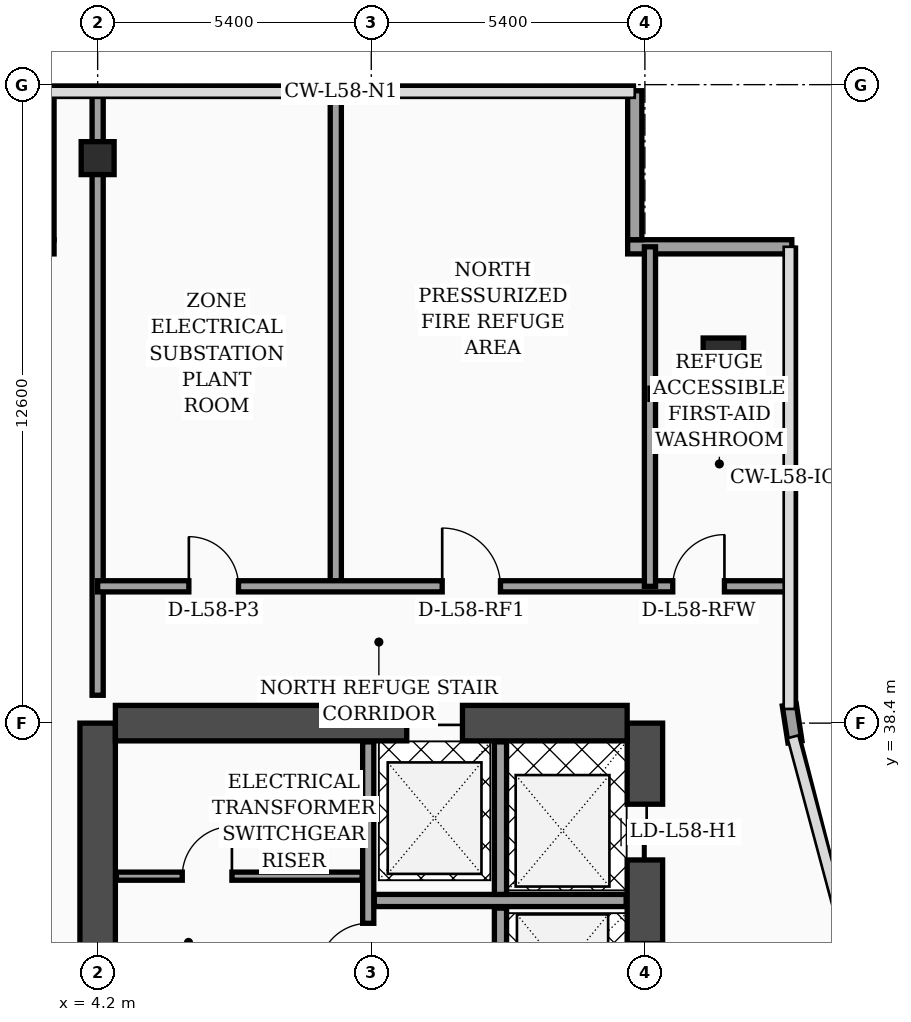
"""IFC4 building model, lengths in metres.
Left out: names, types, materials, properties, quantities, classifications, styles, units other than length and angle.
Written with IfcOpenShell. Run it as: python <this file> out.ifc"""

import sys

from ifc_helpers import new_model, si_unit, direction, frame, frame_2d, origin, origin_2d, place, context, subcontext, project, spatial, rectangle, hollow_rectangle, extrude, element, fill, save


model = new_model("IFC4")
c1 = context("Model", 3, precision=1e-05, world=origin(), true_north=direction((0.0, 1.0)))
c2 = subcontext(c1, "Body", "Model", "MODEL_VIEW")
j1 = project(units=[si_unit("LENGTHUNIT", "METRE"), si_unit("PLANEANGLEUNIT", "RADIAN")], contexts=[c1])
p1 = place(None, origin())
s1 = spatial("IfcSite", under=j1, at=p1, CompositionType="ELEMENT")
p2 = place(p1, origin())
s2 = spatial("IfcBuilding", under=s1, at=p2, CompositionType="ELEMENT")
p3 = place(p2, frame((0.0, 0.0, 234.5)))
s3 = spatial("IfcBuildingStorey", under=s2, at=p3, CompositionType="ELEMENT", Elevation=234.5)
p4 = place(p3, frame((4.2, 16.8, 0.0), z_axis=(0.0, 0.0, 1.0), x_axis=(0.0, 1.0, 0.0)))
e1 = element("IfcWall", 1, at=p4, inside=s3, PredefinedType="SHEAR", context=c2, shape_type="SweptSolid", body=[
    extrude(rectangle(XDim=21.6, YDim=0.7, at=frame_2d((10.8, 0.0))), origin(), (0.0, 0.0, 1.0), 4.56),
])
p5 = place(p3, frame((15.0, 16.8, 0.0), z_axis=(0.0, 0.0, 1.0), x_axis=(0.0, 1.0, 0.0)))
e2 = element("IfcWall", 2, at=p5, inside=s3, PredefinedType="SHEAR", context=c2, shape_type="SweptSolid", body=[
    extrude(rectangle(XDim=21.6, YDim=0.7, at=frame_2d((10.8, 0.0))), origin(), (0.0, 0.0, 1.0), 4.56),
])
p6 = place(p5, frame((8.65, 0.0, 0.0)))
e3 = element("IfcOpeningElement", 3, at=p6, cuts=e2, PredefinedType="OPENING", context=c2, shape_type="SweptSolid", body=[
    extrude(rectangle(XDim=1.1, YDim=2.2, at=frame_2d((0.55, 1.1))), frame((0.0, 0.36, 0.0), z_axis=(0.0, -1.0, 0.0), x_axis=(1.0, 0.0, 0.0)), (0.0, 0.0, 1.0), 0.72),
])
p7 = place(p5, frame((10.85, 0.0, 0.0)))
e4 = element("IfcOpeningElement", 4, at=p7, cuts=e2, PredefinedType="OPENING", context=c2, shape_type="SweptSolid", body=[
    extrude(rectangle(XDim=1.1, YDim=2.2, at=frame_2d((0.55, 1.1))), frame((0.0, 0.36, 0.0), z_axis=(0.0, -1.0, 0.0), x_axis=(1.0, 0.0, 0.0)), (0.0, 0.0, 1.0), 0.72),
])
p8 = place(p5, frame((13.5, 0.0, 0.0)))
e5 = element("IfcOpeningElement", 5, at=p8, cuts=e2, PredefinedType="OPENING", context=c2, shape_type="SweptSolid", body=[
    extrude(rectangle(XDim=1.1, YDim=2.2, at=frame_2d((0.55, 1.1))), frame((0.0, 0.36, 0.0), z_axis=(0.0, -1.0, 0.0), x_axis=(1.0, 0.0, 0.0)), (0.0, 0.0, 1.0), 0.72),
])
p9 = place(p5, frame((16.15, 0.0, 0.0)))
e6 = element("IfcOpeningElement", 6, at=p9, cuts=e2, PredefinedType="OPENING", context=c2, shape_type="SweptSolid", body=[
    extrude(rectangle(XDim=1.1, YDim=2.2, at=frame_2d((0.55, 1.1))), frame((0.0, 0.36, 0.0), z_axis=(0.0, -1.0, 0.0), x_axis=(1.0, 0.0, 0.0)), (0.0, 0.0, 1.0), 0.72),
])
p10 = place(p5, frame((18.9, 0.0, 0.0)))
e7 = element("IfcOpeningElement", 7, at=p10, cuts=e2, PredefinedType="OPENING", context=c2, shape_type="SweptSolid", body=[
    extrude(rectangle(XDim=1.1, YDim=2.2, at=frame_2d((0.55, 1.1))), frame((0.0, 0.36, 0.0), z_axis=(0.0, -1.0, 0.0), x_axis=(1.0, 0.0, 0.0)), (0.0, 0.0, 1.0), 0.72),
])
p11 = place(p3, frame((4.55, 38.4, 0.0), z_axis=(0.0, 0.0, 1.0), x_axis=(1.0, 0.0, 0.0)))
e8 = element("IfcWall", 8, at=p11, inside=s3, PredefinedType="SHEAR", context=c2, shape_type="SweptSolid", body=[
    extrude(rectangle(XDim=10.1, YDim=0.7, at=frame_2d((5.05, 0.0))), origin(), (0.0, 0.0, 1.0), 4.56),
])
p12 = place(p11, frame((5.75, 0.0, 0.0)))
e9 = element("IfcOpeningElement", 9, at=p12, cuts=e8, PredefinedType="OPENING", context=c2, shape_type="SweptSolid", body=[
    extrude(rectangle(XDim=1.1, YDim=2.2, at=frame_2d((0.55, 1.1))), frame((0.0, 0.36, 0.0), z_axis=(0.0, -1.0, 0.0), x_axis=(1.0, 0.0, 0.0)), (0.0, 0.0, 1.0), 0.72),
])
p13 = place(p3, frame((4.2, 49.55, 0.0), z_axis=(0.0, 0.0, 1.0), x_axis=(1.0, 0.0, 0.0)))
e10 = element("IfcColumn", 10, at=p13, inside=s3, PredefinedType="COLUMN", context=c2, shape_type="SweptSolid", body=[
    extrude(hollow_rectangle(XDim=0.65, YDim=0.65, WallThickness=0.028, at=origin_2d()), origin(), (0.0, 0.0, 1.0), 4.56),
])
p14 = place(p3, frame((16.55, 45.6, 0.0), z_axis=(0.0, 0.0, 1.0), x_axis=(1.0, 0.0, 0.0)))
e11 = element("IfcColumn", 11, at=p14, inside=s3, PredefinedType="COLUMN", context=c2, shape_type="SweptSolid", body=[
    extrude(rectangle(XDim=0.8, YDim=0.8, at=origin_2d()), origin(), (0.0, 0.0, 1.0), 4.56),
])
p15 = place(p3, frame((17.962, 38.03, 0.0), z_axis=(0.0, 0.0, 1.0), x_axis=(-0.15141125477, 0.988470855377, 0.0)))
e12 = element("IfcWall", 12, at=p15, inside=s3, PredefinedType="SOLIDWALL", context=c2, shape_type="SweptSolid", body=[
    extrude(rectangle(XDim=0.739, YDim=0.28, at=frame_2d((0.369, 0.0))), origin(), (0.0, 0.0, 1.0), 4.56),
])
p16 = place(p3, frame((17.9, 47.8, 0.0), z_axis=(0.0, 0.0, 1.0), x_axis=(-1.0, 0.0, 0.0)))
e13 = element("IfcWall", 13, at=p16, inside=s3, PredefinedType="SOLIDWALL", context=c2, shape_type="SweptSolid", body=[
    extrude(rectangle(XDim=3.24, YDim=0.28, at=frame_2d((1.62, 0.0))), origin(), (0.0, 0.0, 1.0), 4.56),
])
p17 = place(p3, frame((14.8, 47.94, 0.0), z_axis=(0.0, 0.0, 1.0), x_axis=(0.0, 1.0, 0.0)))
e14 = element("IfcWall", 14, at=p17, inside=s3, PredefinedType="SOLIDWALL", context=c2, shape_type="SweptSolid", body=[
    extrude(rectangle(XDim=2.94, YDim=0.28, at=frame_2d((1.47, 0.0))), origin(), (0.0, 0.0, 1.0), 4.56),
])
p18 = place(p3, frame((3.2, 50.88, 0.0), z_axis=(0.0, 0.0, 1.0), x_axis=(0.0, -1.0, 0.0)))
e15 = element("IfcWall", 15, at=p18, inside=s3, PredefinedType="SOLIDWALL", context=c2, shape_type="SweptSolid", body=[
    extrude(rectangle(XDim=2.94, YDim=0.28, at=frame_2d((1.47, 0.0))), origin(), (0.0, 0.0, 1.0), 4.09),
])
p19 = place(p3, frame((3.34, 47.8, 0.0), z_axis=(0.0, 0.0, 1.0), x_axis=(-1.0, 0.0, 0.0)))
e16 = element("IfcWall", 16, at=p19, inside=s3, PredefinedType="SOLIDWALL", context=c2, shape_type="SweptSolid", body=[
    extrude(rectangle(XDim=3.22, YDim=0.28, at=frame_2d((1.61, 0.0))), origin(), (0.0, 0.0, 1.0), 4.09),
])
p20 = place(p3, frame((4.57, 35.38, 0.0), z_axis=(0.0, 0.0, 1.0), x_axis=(1.0, 0.0, 0.0)))
e17 = element("IfcWall", 17, at=p20, inside=s3, PredefinedType="PARTITIONING", context=c2, shape_type="SweptSolid", body=[
    extrude(rectangle(XDim=4.85, YDim=0.16, at=frame_2d((2.425, 0.0))), origin(), (0.0, 0.0, 1.0), 4.56),
])
p21 = place(p20, frame((1.3, 0.0, 0.0)))
e18 = element("IfcOpeningElement", 18, at=p21, cuts=e17, PredefinedType="OPENING", context=c2, shape_type="SweptSolid", body=[
    extrude(rectangle(XDim=0.98, YDim=2.15, at=frame_2d((0.49, 1.075))), frame((0.0, 0.09, 0.0), z_axis=(0.0, -1.0, 0.0), x_axis=(1.0, 0.0, 0.0)), (0.0, 0.0, 1.0), 0.18),
])
p22 = place(p3, frame((9.54, 32.92, 0.0), z_axis=(0.0, 0.0, 1.0), x_axis=(0.0, 1.0, 0.0)))
e19 = element("IfcWall", 19, at=p22, inside=s3, PredefinedType="SOLIDWALL", context=c2, shape_type="SweptSolid", body=[
    extrude(rectangle(XDim=5.11, YDim=0.22, at=frame_2d((2.555, 0.0))), origin(), (0.0, 0.0, 1.0), 4.56),
])
p23 = place(p22, frame((0.55, 0.0, 0.0)))
e20 = element("IfcOpeningElement", 20, at=p23, cuts=e19, PredefinedType="OPENING", context=c2, shape_type="SweptSolid", body=[
    extrude(rectangle(XDim=0.98, YDim=2.15, at=frame_2d((0.49, 1.075))), frame((0.0, 0.12, 0.0), z_axis=(0.0, -1.0, 0.0), x_axis=(1.0, 0.0, 0.0)), (0.0, 0.0, 1.0), 0.24),
])
p24 = place(p3, frame((12.15, 27.0, 0.0), z_axis=(0.0, 0.0, 1.0), x_axis=(0.0, 1.0, 0.0)))
e21 = element("IfcWall", 21, at=p24, inside=s3, PredefinedType="SOLIDWALL", context=c2, shape_type="SweptSolid", body=[
    extrude(rectangle(XDim=7.75, YDim=0.24, at=frame_2d((3.875, 0.0))), origin(), (0.0, 0.0, 1.0), 4.56),
])
p25 = place(p3, frame((9.66, 34.9, 0.0), z_axis=(0.0, 0.0, 1.0), x_axis=(1.0, 0.0, 0.0)))
e22 = element("IfcWall", 22, at=p25, inside=s3, PredefinedType="SOLIDWALL", context=c2, shape_type="SweptSolid", body=[
    extrude(rectangle(XDim=4.97, YDim=0.24, at=frame_2d((2.485, 0.0))), origin(), (0.0, 0.0, 1.0), 4.56),
])
p26 = place(p3, frame((12.15, 35.02, 0.0), z_axis=(0.0, 0.0, 1.0), x_axis=(0.0, 1.0, 0.0)))
e23 = element("IfcWall", 23, at=p26, inside=s3, PredefinedType="SOLIDWALL", context=c2, shape_type="SweptSolid", body=[
    extrude(rectangle(XDim=3.01, YDim=0.24, at=frame_2d((1.505, 0.0))), origin(), (0.0, 0.0, 1.0), 4.56),
])
p27 = place(p3, frame((4.2, 38.95, 0.0), z_axis=(0.0, 0.0, 1.0), x_axis=(0.0, 1.0, 0.0)))
e24 = element("IfcWall", 24, at=p27, inside=s3, PredefinedType="SOLIDWALL", context=c2, shape_type="SweptSolid", body=[
    extrude(rectangle(XDim=11.99, YDim=0.22, at=frame_2d((5.995, 0.0))), origin(), (0.0, 0.0, 1.0), 3.94),
])
p28 = place(p3, frame((8.9, 41.1, 0.0), z_axis=(0.0, 0.0, 1.0), x_axis=(0.0, 1.0, 0.0)))
e25 = element("IfcWall", 25, at=p28, inside=s3, PredefinedType="SOLIDWALL", context=c2, shape_type="SweptSolid", body=[
    extrude(rectangle(XDim=9.84, YDim=0.22, at=frame_2d((4.92, 0.0))), origin(), (0.0, 0.0, 1.0), 4.09),
])
p29 = place(p3, frame((4.2, 41.1, 0.0), z_axis=(0.0, 0.0, 1.0), x_axis=(1.0, 0.0, 0.0)))
e26 = element("IfcWall", 26, at=p29, inside=s3, PredefinedType="SOLIDWALL", context=c2, shape_type="SweptSolid", body=[
    extrude(rectangle(XDim=13.65, YDim=0.22, at=frame_2d((6.825, 0.0))), origin(), (0.0, 0.0, 1.0), 3.94),
])
p30 = place(p29, frame((1.8, 0.0, 0.0)))
e27 = element("IfcOpeningElement", 27, at=p30, cuts=e26, PredefinedType="OPENING", context=c2, shape_type="SweptSolid", body=[
    extrude(rectangle(XDim=0.98, YDim=2.15, at=frame_2d((0.49, 1.075))), frame((0.0, 0.12, 0.0), z_axis=(0.0, -1.0, 0.0), x_axis=(1.0, 0.0, 0.0)), (0.0, 0.0, 1.0), 0.24),
])
p31 = place(p29, frame((6.8, 0.0, 0.0)))
e28 = element("IfcOpeningElement", 28, at=p31, cuts=e26, PredefinedType="OPENING", context=c2, shape_type="SweptSolid", body=[
    extrude(rectangle(XDim=1.15, YDim=2.2, at=frame_2d((0.575, 1.1))), frame((0.0, 0.12, 0.0), z_axis=(0.0, -1.0, 0.0), x_axis=(1.0, 0.0, 0.0)), (0.0, 0.0, 1.0), 0.24),
])
p32 = place(p29, frame((11.35, 0.0, 0.0)))
e29 = element("IfcOpeningElement", 29, at=p32, cuts=e26, PredefinedType="OPENING", context=c2, shape_type="SweptSolid", body=[
    extrude(rectangle(XDim=1.02, YDim=2.2, at=frame_2d((0.51, 1.1))), frame((0.0, 0.12, 0.0), z_axis=(0.0, -1.0, 0.0), x_axis=(1.0, 0.0, 0.0)), (0.0, 0.0, 1.0), 0.24),
])
p33 = place(p3, frame((15.1, 41.1, 0.0), z_axis=(0.0, 0.0, 1.0), x_axis=(0.0, 1.0, 0.0)))
e30 = element("IfcWall", 30, at=p33, inside=s3, PredefinedType="SOLIDWALL", context=c2, shape_type="SweptSolid", body=[
    extrude(rectangle(XDim=6.7, YDim=0.22, at=frame_2d((3.35, 0.0))), origin(), (0.0, 0.0, 1.0), 3.94),
])
p34 = place(p3, frame((15.1, 44.9, 0.0), z_axis=(0.0, 0.0, 1.0), x_axis=(1.0, 0.0, 0.0)))
e31 = element("IfcWall", 31, at=p34, inside=s3, PredefinedType="SOLIDWALL", context=c2, shape_type="SweptSolid", body=[
    extrude(rectangle(XDim=2.75, YDim=0.22, at=frame_2d((1.375, 0.0))), origin(), (0.0, 0.0, 1.0), 3.94),
])
p35 = place(p21, origin())
e32 = element("IfcDoor", 32, at=p35, inside=s3, OperationType="SINGLE_SWING_RIGHT", PredefinedType="DOOR", context=c2, shape_type="SweptSolid", body=[
    extrude(rectangle(XDim=0.98, YDim=2.15, at=frame_2d((0.49, 1.075))), frame((0.0, 0.025, 0.0), z_axis=(0.0, -1.0, 0.0), x_axis=(1.0, 0.0, 0.0)), (0.0, 0.0, 1.0), 0.05),
])
fill(e18, e32)
p36 = place(p23, origin())
e33 = element("IfcDoor", 33, at=p36, inside=s3, OperationType="SINGLE_SWING_LEFT", PredefinedType="DOOR", context=c2, shape_type="SweptSolid", body=[
    extrude(rectangle(XDim=0.98, YDim=2.15, at=frame_2d((0.49, 1.075))), frame((0.0, 0.025, 0.0), z_axis=(0.0, -1.0, 0.0), x_axis=(1.0, 0.0, 0.0)), (0.0, 0.0, 1.0), 0.05),
])
fill(e20, e33)
p37 = place(p30, origin())
e34 = element("IfcDoor", 34, at=p37, inside=s3, OperationType="SINGLE_SWING_LEFT", PredefinedType="DOOR", context=c2, shape_type="SweptSolid", body=[
    extrude(rectangle(XDim=0.98, YDim=2.15, at=frame_2d((0.49, 1.075))), frame((0.0, 0.025, 0.0), z_axis=(0.0, -1.0, 0.0), x_axis=(1.0, 0.0, 0.0)), (0.0, 0.0, 1.0), 0.05),
])
fill(e27, e34)
p38 = place(p31, origin())
e35 = element("IfcDoor", 35, at=p38, inside=s3, OperationType="SINGLE_SWING_LEFT", PredefinedType="DOOR", context=c2, shape_type="SweptSolid", body=[
    extrude(rectangle(XDim=1.15, YDim=2.2, at=frame_2d((0.575, 1.1))), frame((0.0, 0.025, 0.0), z_axis=(0.0, -1.0, 0.0), x_axis=(1.0, 0.0, 0.0)), (0.0, 0.0, 1.0), 0.05),
])
fill(e28, e35)
p39 = place(p32, origin())
e36 = element("IfcDoor", 36, at=p39, inside=s3, OperationType="SINGLE_SWING_RIGHT", PredefinedType="DOOR", context=c2, shape_type="SweptSolid", body=[
    extrude(rectangle(XDim=1.02, YDim=2.2, at=frame_2d((0.51, 1.1))), frame((0.0, 0.025, 0.0), z_axis=(0.0, -1.0, 0.0), x_axis=(1.0, 0.0, 0.0)), (0.0, 0.0, 1.0), 0.05),
])
fill(e29, e36)
p40 = place(p10, origin())
e37 = element("IfcDoor", 37, at=p40, inside=s3, OperationType="DOUBLE_DOOR_SLIDING", PredefinedType="DOOR", context=c2, shape_type="SweptSolid", body=[
    extrude(rectangle(XDim=1.1, YDim=2.2, at=frame_2d((0.55, 1.1))), frame((0.0, 0.025, 0.0), z_axis=(0.0, -1.0, 0.0), x_axis=(1.0, 0.0, 0.0)), (0.0, 0.0, 1.0), 0.05),
])
fill(e7, e37)
p41 = place(p12, origin())
e38 = element("IfcDoor", 38, at=p41, inside=s3, OperationType="DOUBLE_DOOR_SLIDING", PredefinedType="DOOR", context=c2, shape_type="SweptSolid", body=[
    extrude(rectangle(XDim=1.1, YDim=2.2, at=frame_2d((0.55, 1.1))), frame((0.0, 0.025, 0.0), z_axis=(0.0, -1.0, 0.0), x_axis=(1.0, 0.0, 0.0)), (0.0, 0.0, 1.0), 0.05),
])
fill(e9, e38)
save(model, sys.argv[1])
